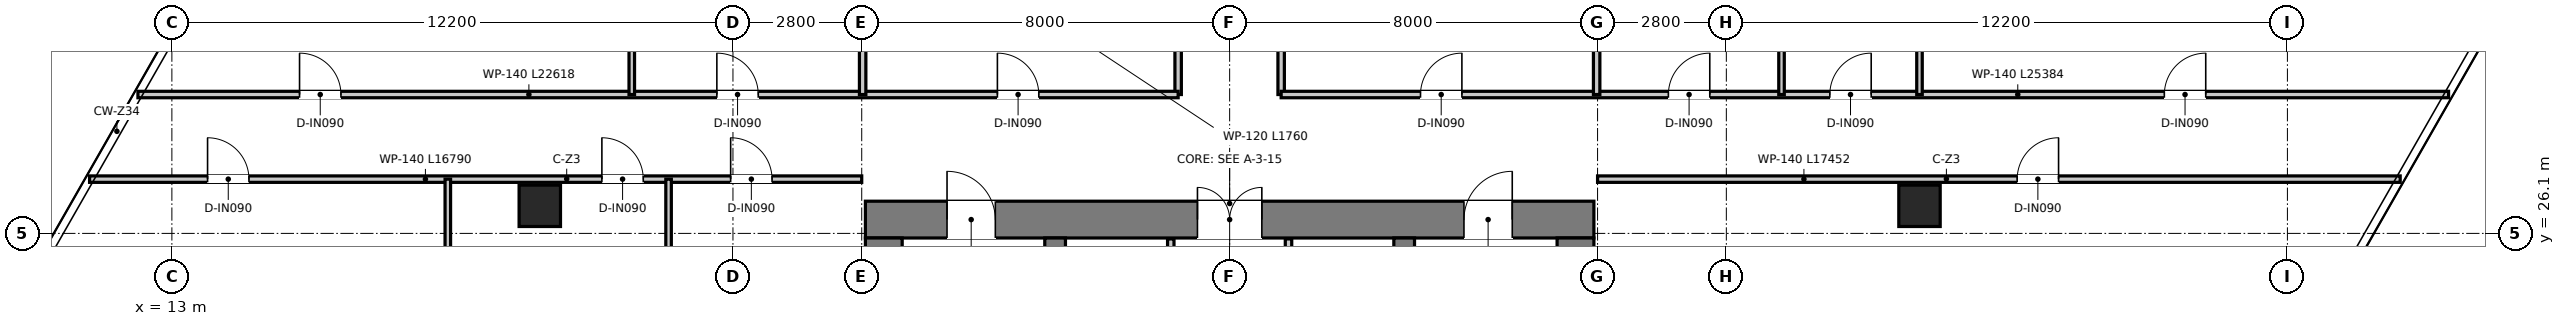
"""IFC4 building model, lengths in metres.
Left out: names, types, materials, properties, quantities, classifications, styles, units other than length and angle.
Written with IfcOpenShell. Run it as: python <this file> out.ifc"""

import sys

from ifc_helpers import new_model, si_unit, direction, frame, frame_2d, origin, origin_2d, place, context, subcontext, project, spatial, rectangle, extrude, source, transform, mapped, element, fill, save


model = new_model("IFC4")
c1 = context("Model", 3, precision=1e-05, world=origin(), true_north=direction((0.0, 1.0)))
c2 = subcontext(c1, "Body", "Model", "MODEL_VIEW")
j1 = project(units=[si_unit("LENGTHUNIT", "METRE"), si_unit("PLANEANGLEUNIT", "RADIAN")], contexts=[c1])
p1 = place(None, origin())
s1 = spatial("IfcSite", under=j1, at=p1, CompositionType="ELEMENT")
p2 = place(p1, origin())
s2 = spatial("IfcBuilding", under=s1, at=p2, CompositionType="ELEMENT")
p3 = place(p2, frame((0.0, 0.0, 162.0)))
s3 = spatial("IfcBuildingStorey", under=s2, at=p3, CompositionType="ELEMENT", Elevation=162.0)
p4 = place(p3, frame((28.08, 26.4, 0.0), z_axis=(0.0, 0.0, 1.0), x_axis=(1.0, 0.0, 0.0)))
e1 = element("IfcWall", 1, at=p4, inside=s3, PredefinedType="SHEAR", context=c2, shape_type="SweptSolid", body=[
    extrude(rectangle(XDim=15.84, YDim=0.8, at=frame_2d((7.92, 0.0))), origin(), (0.0, 0.0, 1.0), 3.95),
])
p5 = place(p4, frame((7.22, 0.0, 0.0)))
e2 = element("IfcOpeningElement", 2, at=p5, cuts=e1, PredefinedType="OPENING", context=c2, shape_type="SweptSolid", body=[
    extrude(rectangle(XDim=1.4, YDim=2.2, at=frame_2d((0.7, 1.1))), frame((0.0, 0.41, 0.0), z_axis=(0.0, -1.0, 0.0), x_axis=(1.0, 0.0, 0.0)), (0.0, 0.0, 1.0), 0.82),
])
p6 = place(p4, frame((1.775, 0.0, 0.0)))
e3 = element("IfcOpeningElement", 3, at=p6, cuts=e1, PredefinedType="OPENING", context=c2, shape_type="SweptSolid", body=[
    extrude(rectangle(XDim=1.05, YDim=2.1, at=frame_2d((0.525, 1.05))), frame((0.0, 0.41, 0.0), z_axis=(0.0, -1.0, 0.0), x_axis=(1.0, 0.0, 0.0)), (0.0, 0.0, 1.0), 0.82),
])
p7 = place(p4, frame((13.015, 0.0, 0.0)))
e4 = element("IfcOpeningElement", 4, at=p7, cuts=e1, PredefinedType="OPENING", context=c2, shape_type="SweptSolid", body=[
    extrude(rectangle(XDim=1.05, YDim=2.1, at=frame_2d((0.525, 1.05))), frame((0.0, 0.41, 0.0), z_axis=(0.0, -1.0, 0.0), x_axis=(1.0, 0.0, 0.0)), (0.0, 0.0, 1.0), 0.82),
])
for number, where, z_axis, x_axis in (
    (5, (28.48, 11.3, 0.0), (0.0, 0.0, 1.0), (0.0, 1.0, 0.0)),
    (6, (43.52, 11.3, 0.0), (0.0, 0.0, 1.0), (0.0, 1.0, 0.0)),
):
    element("IfcWall", number, at=place(p3, frame(where, z_axis=z_axis, x_axis=x_axis)), inside=s3, PredefinedType="SHEAR", context=c2, shape_type="SweptSolid", body=[
        extrude(rectangle(XDim=14.7, YDim=0.8, at=frame_2d((7.35, 0.0))), origin(), (0.0, 0.0, 1.0), 3.95),
    ])
p8 = place(p3, frame((32.205, 13.22, 0.0), z_axis=(0.0, 0.0, 1.0), x_axis=(0.0, 1.0, 0.0)))
e7 = element("IfcWall", 7, at=p8, inside=s3, PredefinedType="SHEAR", context=c2, shape_type="SweptSolid", body=[
    extrude(rectangle(XDim=12.78, YDim=0.45, at=frame_2d((6.39, 0.0))), origin(), (0.0, 0.0, 1.0), 3.95),
])
p9 = place(p8, frame((10.58, 0.0, 0.0)))
e8 = element("IfcOpeningElement", 8, at=p9, cuts=e7, PredefinedType="OPENING", context=c2, shape_type="SweptSolid", body=[
    extrude(rectangle(XDim=1.1, YDim=2.15, at=frame_2d((0.55, 1.075))), frame((0.0, 0.235, 0.0), z_axis=(0.0, -1.0, 0.0), x_axis=(1.0, 0.0, 0.0)), (0.0, 0.0, 1.0), 0.47),
])
p10 = place(p3, frame((39.795, 13.22, 0.0), z_axis=(0.0, 0.0, 1.0), x_axis=(0.0, 1.0, 0.0)))
e9 = element("IfcWall", 9, at=p10, inside=s3, PredefinedType="SHEAR", context=c2, shape_type="SweptSolid", body=[
    extrude(rectangle(XDim=12.78, YDim=0.45, at=frame_2d((6.39, 0.0))), origin(), (0.0, 0.0, 1.0), 3.95),
])
p11 = place(p10, frame((10.58, 0.0, 0.0)))
e10 = element("IfcOpeningElement", 10, at=p11, cuts=e9, PredefinedType="OPENING", context=c2, shape_type="SweptSolid", body=[
    extrude(rectangle(XDim=1.1, YDim=2.15, at=frame_2d((0.55, 1.075))), frame((0.0, 0.235, 0.0), z_axis=(0.0, -1.0, 0.0), x_axis=(1.0, 0.0, 0.0)), (0.0, 0.0, 1.0), 0.47),
])
m1 = source(origin(), c2, "Body", "SweptSolid", [
    extrude(rectangle(XDim=0.9, YDim=0.9, at=origin_2d()), origin(), (0.0, 0.0, 1.0), 3.95),
])
for number, where, z_axis, x_axis in (
    (11, (21.0, 26.7, 0.0), (0.0, 0.0, 1.0), (1.0, 0.0, 0.0)),
    (12, (51.0, 26.7, 0.0), (0.0, 0.0, 1.0), (1.0, 0.0, 0.0)),
):
    element("IfcColumn", number, at=place(p3, frame(where, z_axis=z_axis, x_axis=x_axis)), inside=s3, PredefinedType="COLUMN", context=c2, shape_type="MappedRepresentation", body=[
        mapped(m1, transform((0.0, 0.0, 0.0), x_axis=(1.0, 0.0, 0.0), y_axis=(0.0, 1.0, 0.0), z_axis=(0.0, 0.0, 1.0), scale=1.0)),
    ])
p12 = place(p3, frame((34.72, 20.2, 0.0), z_axis=(0.0, 0.0, 1.0), x_axis=(0.0, 1.0, 0.0)))
e13 = element("IfcWall", 13, at=p12, inside=s3, PredefinedType="PARTITIONING", context=c2, shape_type="SweptSolid", body=[
    extrude(rectangle(XDim=5.78, YDim=0.14, at=frame_2d((2.89, 0.0))), origin(), (0.0, 0.0, 1.0), 2.67),
])
p13 = place(p12, frame((1.05, 0.0, 0.0)))
e14 = element("IfcOpeningElement", 14, at=p13, cuts=e13, PredefinedType="OPENING", context=c2, shape_type="SweptSolid", body=[
    extrude(rectangle(XDim=0.9, YDim=2.1, at=frame_2d((0.45, 1.05))), frame((0.0, 0.08, 0.0), z_axis=(0.0, -1.0, 0.0), x_axis=(1.0, 0.0, 0.0)), (0.0, 0.0, 1.0), 0.16),
])
p14 = place(p3, frame((37.28, 20.2, 0.0), z_axis=(0.0, 0.0, 1.0), x_axis=(0.0, 1.0, 0.0)))
e15 = element("IfcWall", 15, at=p14, inside=s3, PredefinedType="PARTITIONING", context=c2, shape_type="SweptSolid", body=[
    extrude(rectangle(XDim=5.78, YDim=0.14, at=frame_2d((2.89, 0.0))), origin(), (0.0, 0.0, 1.0), 2.67),
])
p15 = place(p14, frame((0.95, 0.0, 0.0)))
e16 = element("IfcOpeningElement", 16, at=p15, cuts=e15, PredefinedType="OPENING", context=c2, shape_type="SweptSolid", body=[
    extrude(rectangle(XDim=1.1, YDim=2.15, at=frame_2d((0.55, 1.075))), frame((0.0, 0.08, 0.0), z_axis=(0.0, -1.0, 0.0), x_axis=(1.0, 0.0, 0.0)), (0.0, 0.0, 1.0), 0.16),
])
p16 = place(p3, frame((34.88, 29.12, 0.0), z_axis=(0.0, 0.0, 1.0), x_axis=(0.0, 1.0, 0.0)))
e17 = element("IfcWall", 17, at=p16, inside=s3, PredefinedType="PARTITIONING", context=c2, shape_type="SweptSolid", body=[
    extrude(rectangle(XDim=11.76, YDim=0.14, at=frame_2d((5.88, 0.0))), origin(), (0.0, 0.0, 1.0), 3.03),
])
p17 = place(p16, frame((4.085, 0.0, 0.0)))
e18 = element("IfcOpeningElement", 18, at=p17, cuts=e17, PredefinedType="OPENING", context=c2, shape_type="SweptSolid", body=[
    extrude(rectangle(XDim=0.95, YDim=2.1, at=frame_2d((0.475, 1.05))), frame((0.0, 0.08, 0.0), z_axis=(0.0, -1.0, 0.0), x_axis=(1.0, 0.0, 0.0)), (0.0, 0.0, 1.0), 0.16),
])
p18 = place(p16, frame((6.82, 0.0, 0.0)))
e19 = element("IfcOpeningElement", 19, at=p18, cuts=e17, PredefinedType="OPENING", context=c2, shape_type="SweptSolid", body=[
    extrude(rectangle(XDim=0.9, YDim=2.1, at=frame_2d((0.45, 1.05))), frame((0.0, 0.08, 0.0), z_axis=(0.0, -1.0, 0.0), x_axis=(1.0, 0.0, 0.0)), (0.0, 0.0, 1.0), 0.16),
])
p19 = place(p16, frame((9.83, 0.0, 0.0)))
e20 = element("IfcOpeningElement", 20, at=p19, cuts=e17, PredefinedType="OPENING", context=c2, shape_type="SweptSolid", body=[
    extrude(rectangle(XDim=0.9, YDim=2.1, at=frame_2d((0.45, 1.05))), frame((0.0, 0.08, 0.0), z_axis=(0.0, -1.0, 0.0), x_axis=(1.0, 0.0, 0.0)), (0.0, 0.0, 1.0), 0.16),
])
p20 = place(p3, frame((37.12, 29.12, 0.0), z_axis=(0.0, 0.0, 1.0), x_axis=(0.0, 1.0, 0.0)))
e21 = element("IfcWall", 21, at=p20, inside=s3, PredefinedType="PARTITIONING", context=c2, shape_type="SweptSolid", body=[
    extrude(rectangle(XDim=11.76, YDim=0.14, at=frame_2d((5.88, 0.0))), origin(), (0.0, 0.0, 1.0), 3.03),
])
p21 = place(p20, frame((3.205, 0.0, 0.0)))
e22 = element("IfcOpeningElement", 22, at=p21, cuts=e21, PredefinedType="OPENING", context=c2, shape_type="SweptSolid", body=[
    extrude(rectangle(XDim=0.95, YDim=2.1, at=frame_2d((0.475, 1.05))), frame((0.0, 0.08, 0.0), z_axis=(0.0, -1.0, 0.0), x_axis=(1.0, 0.0, 0.0)), (0.0, 0.0, 1.0), 0.16),
])
p22 = place(p20, frame((8.02, 0.0, 0.0)))
e23 = element("IfcOpeningElement", 23, at=p22, cuts=e21, PredefinedType="OPENING", context=c2, shape_type="SweptSolid", body=[
    extrude(rectangle(XDim=0.9, YDim=2.1, at=frame_2d((0.45, 1.05))), frame((0.0, 0.08, 0.0), z_axis=(0.0, -1.0, 0.0), x_axis=(1.0, 0.0, 0.0)), (0.0, 0.0, 1.0), 0.16),
])
p23 = place(p3, frame((12.262, 29.12, 0.0), z_axis=(0.0, 0.0, 1.0), x_axis=(1.0, 0.0, 0.0)))
e24 = element("IfcWall", 24, at=p23, inside=s3, PredefinedType="PARTITIONING", context=c2, shape_type="SweptSolid", body=[
    extrude(rectangle(XDim=22.618, YDim=0.14, at=frame_2d((11.309, 0.0))), origin(), (0.0, 0.0, 1.0), 3.03),
])
p24 = place(p23, frame((18.688, 0.0, 0.0)))
e25 = element("IfcOpeningElement", 25, at=p24, cuts=e24, PredefinedType="OPENING", context=c2, shape_type="SweptSolid", body=[
    extrude(rectangle(XDim=0.9, YDim=2.1, at=frame_2d((0.45, 1.05))), frame((0.0, 0.08, 0.0), z_axis=(0.0, -1.0, 0.0), x_axis=(1.0, 0.0, 0.0)), (0.0, 0.0, 1.0), 0.16),
])
p25 = place(p23, frame((3.514, 0.0, 0.0)))
e26 = element("IfcOpeningElement", 26, at=p25, cuts=e24, PredefinedType="OPENING", context=c2, shape_type="SweptSolid", body=[
    extrude(rectangle(XDim=0.9, YDim=2.1, at=frame_2d((0.45, 1.05))), frame((0.0, 0.08, 0.0), z_axis=(0.0, -1.0, 0.0), x_axis=(1.0, 0.0, 0.0)), (0.0, 0.0, 1.0), 0.16),
])
p26 = place(p23, frame((12.588, 0.0, 0.0)))
e27 = element("IfcOpeningElement", 27, at=p26, cuts=e24, PredefinedType="OPENING", context=c2, shape_type="SweptSolid", body=[
    extrude(rectangle(XDim=0.9, YDim=2.1, at=frame_2d((0.45, 1.05))), frame((0.0, 0.08, 0.0), z_axis=(0.0, -1.0, 0.0), x_axis=(1.0, 0.0, 0.0)), (0.0, 0.0, 1.0), 0.16),
])
p27 = place(p3, frame((37.12, 29.12, 0.0), z_axis=(0.0, 0.0, 1.0), x_axis=(1.0, 0.0, 0.0)))
e28 = element("IfcWall", 28, at=p27, inside=s3, PredefinedType="PARTITIONING", context=c2, shape_type="SweptSolid", body=[
    extrude(rectangle(XDim=25.384, YDim=0.14, at=frame_2d((12.692, 0.0))), origin(), (0.0, 0.0, 1.0), 3.03),
])
p28 = place(p27, frame((3.03, 0.0, 0.0)))
e29 = element("IfcOpeningElement", 29, at=p28, cuts=e28, PredefinedType="OPENING", context=c2, shape_type="SweptSolid", body=[
    extrude(rectangle(XDim=0.9, YDim=2.1, at=frame_2d((0.45, 1.05))), frame((0.0, 0.08, 0.0), z_axis=(0.0, -1.0, 0.0), x_axis=(1.0, 0.0, 0.0)), (0.0, 0.0, 1.0), 0.16),
])
p29 = place(p27, frame((8.42, 0.0, 0.0)))
e30 = element("IfcOpeningElement", 30, at=p29, cuts=e28, PredefinedType="OPENING", context=c2, shape_type="SweptSolid", body=[
    extrude(rectangle(XDim=0.9, YDim=2.1, at=frame_2d((0.45, 1.05))), frame((0.0, 0.08, 0.0), z_axis=(0.0, -1.0, 0.0), x_axis=(1.0, 0.0, 0.0)), (0.0, 0.0, 1.0), 0.16),
])
p30 = place(p27, frame((11.93, 0.0, 0.0)))
e31 = element("IfcOpeningElement", 31, at=p30, cuts=e28, PredefinedType="OPENING", context=c2, shape_type="SweptSolid", body=[
    extrude(rectangle(XDim=0.9, YDim=2.1, at=frame_2d((0.45, 1.05))), frame((0.0, 0.08, 0.0), z_axis=(0.0, -1.0, 0.0), x_axis=(1.0, 0.0, 0.0)), (0.0, 0.0, 1.0), 0.16),
])
p31 = place(p27, frame((19.204, 0.0, 0.0)))
e32 = element("IfcOpeningElement", 32, at=p31, cuts=e28, PredefinedType="OPENING", context=c2, shape_type="SweptSolid", body=[
    extrude(rectangle(XDim=0.9, YDim=2.1, at=frame_2d((0.45, 1.05))), frame((0.0, 0.08, 0.0), z_axis=(0.0, -1.0, 0.0), x_axis=(1.0, 0.0, 0.0)), (0.0, 0.0, 1.0), 0.16),
])
p32 = place(p3, frame((11.21, 27.28, 0.0), z_axis=(0.0, 0.0, 1.0), x_axis=(1.0, 0.0, 0.0)))
e33 = element("IfcWall", 33, at=p32, inside=s3, PredefinedType="PARTITIONING", context=c2, shape_type="SweptSolid", body=[
    extrude(rectangle(XDim=16.79, YDim=0.14, at=frame_2d((8.395, 0.0))), origin(), (0.0, 0.0, 1.0), 3.03),
])
p33 = place(p32, frame((2.565, 0.0, 0.0)))
e34 = element("IfcOpeningElement", 34, at=p33, cuts=e33, PredefinedType="OPENING", context=c2, shape_type="SweptSolid", body=[
    extrude(rectangle(XDim=0.9, YDim=2.1, at=frame_2d((0.45, 1.05))), frame((0.0, 0.08, 0.0), z_axis=(0.0, -1.0, 0.0), x_axis=(1.0, 0.0, 0.0)), (0.0, 0.0, 1.0), 0.16),
])
p34 = place(p32, frame((11.139, 0.0, 0.0)))
e35 = element("IfcOpeningElement", 35, at=p34, cuts=e33, PredefinedType="OPENING", context=c2, shape_type="SweptSolid", body=[
    extrude(rectangle(XDim=0.9, YDim=2.1, at=frame_2d((0.45, 1.05))), frame((0.0, 0.08, 0.0), z_axis=(0.0, -1.0, 0.0), x_axis=(1.0, 0.0, 0.0)), (0.0, 0.0, 1.0), 0.16),
])
p35 = place(p32, frame((13.939, 0.0, 0.0)))
e36 = element("IfcOpeningElement", 36, at=p35, cuts=e33, PredefinedType="OPENING", context=c2, shape_type="SweptSolid", body=[
    extrude(rectangle(XDim=0.9, YDim=2.1, at=frame_2d((0.45, 1.05))), frame((0.0, 0.08, 0.0), z_axis=(0.0, -1.0, 0.0), x_axis=(1.0, 0.0, 0.0)), (0.0, 0.0, 1.0), 0.16),
])
p36 = place(p3, frame((44.0, 27.28, 0.0), z_axis=(0.0, 0.0, 1.0), x_axis=(1.0, 0.0, 0.0)))
e37 = element("IfcWall", 37, at=p36, inside=s3, PredefinedType="PARTITIONING", context=c2, shape_type="SweptSolid", body=[
    extrude(rectangle(XDim=17.452, YDim=0.14, at=frame_2d((8.726, 0.0))), origin(), (0.0, 0.0, 1.0), 3.03),
])
p37 = place(p36, frame((9.124, 0.0, 0.0)))
e38 = element("IfcOpeningElement", 38, at=p37, cuts=e37, PredefinedType="OPENING", context=c2, shape_type="SweptSolid", body=[
    extrude(rectangle(XDim=0.9, YDim=2.1, at=frame_2d((0.45, 1.05))), frame((0.0, 0.08, 0.0), z_axis=(0.0, -1.0, 0.0), x_axis=(1.0, 0.0, 0.0)), (0.0, 0.0, 1.0), 0.16),
])
for number, where, z_axis, x_axis in (
    (39, (28.02, 29.12, 0.0), (0.0, 0.0, 1.0), (0.0, 1.0, 0.0)),
    (40, (43.98, 29.12, 0.0), (0.0, 0.0, 1.0), (0.0, 1.0, 0.0)),
):
    element("IfcWall", number, at=place(p3, frame(where, z_axis=z_axis, x_axis=x_axis)), inside=s3, PredefinedType="PARTITIONING", context=c2, shape_type="SweptSolid", body=[
        extrude(rectangle(XDim=5.46, YDim=0.14, at=frame_2d((2.73, 0.0))), origin(), (0.0, 0.0, 1.0), 3.31),
    ])
p38 = place(p3, frame((23.0, 29.12, 0.0), z_axis=(0.0, 0.0, 1.0), x_axis=(0.0, 1.0, 0.0)))
e41 = element("IfcWall", 41, at=p38, inside=s3, PredefinedType="PARTITIONING", context=c2, shape_type="SweptSolid", body=[
    extrude(rectangle(XDim=18.787, YDim=0.12, at=frame_2d((9.394, 0.0))), origin(), (0.0, 0.0, 1.0), 3.08),
])
p39 = place(p3, frame((48.0, 29.12, 0.0), z_axis=(0.0, 0.0, 1.0), x_axis=(0.0, 1.0, 0.0)))
e42 = element("IfcWall", 42, at=p39, inside=s3, PredefinedType="PARTITIONING", context=c2, shape_type="SweptSolid", body=[
    extrude(rectangle(XDim=15.842, YDim=0.12, at=frame_2d((7.921, 0.0))), origin(), (0.0, 0.0, 1.0), 3.08),
])
p40 = place(p3, frame((51.0, 29.12, 0.0), z_axis=(0.0, 0.0, 1.0), x_axis=(0.0, 1.0, 0.0)))
e43 = element("IfcWall", 43, at=p40, inside=s3, PredefinedType="PARTITIONING", context=c2, shape_type="SweptSolid", body=[
    extrude(rectangle(XDim=14.128, YDim=0.12, at=frame_2d((7.064, 0.0))), origin(), (0.0, 0.0, 1.0), 3.08),
])
p41 = place(p3, frame((19.0, 11.295, 0.0), z_axis=(0.0, 0.0, 1.0), x_axis=(0.0, 1.0, 0.0)))
e44 = element("IfcWall", 44, at=p41, inside=s3, PredefinedType="PARTITIONING", context=c2, shape_type="SweptSolid", body=[
    extrude(rectangle(XDim=15.985, YDim=0.12, at=frame_2d((7.992, 0.0))), origin(), (0.0, 0.0, 1.0), 3.67),
])
p42 = place(p3, frame((23.8, 8.552, 0.0), z_axis=(0.0, 0.0, 1.0), x_axis=(0.0, 1.0, 0.0)))
e45 = element("IfcWall", 45, at=p42, inside=s3, PredefinedType="PARTITIONING", context=c2, shape_type="SweptSolid", body=[
    extrude(rectangle(XDim=18.728, YDim=0.12, at=frame_2d((9.364, 0.0))), origin(), (0.0, 0.0, 1.0), 3.08),
])
p43 = place(p5, origin())
e46 = element("IfcDoor", 46, at=p43, inside=s3, OperationType="DOUBLE_DOOR_SINGLE_SWING", PredefinedType="DOOR", context=c2, shape_type="SweptSolid", body=[
    extrude(rectangle(XDim=1.4, YDim=2.2, at=frame_2d((0.7, 1.1))), frame((0.0, 0.025, 0.0), z_axis=(0.0, -1.0, 0.0), x_axis=(1.0, 0.0, 0.0)), (0.0, 0.0, 1.0), 0.05),
])
fill(e2, e46)
p44 = place(p6, origin())
e47 = element("IfcDoor", 47, at=p44, inside=s3, OperationType="SINGLE_SWING_LEFT", PredefinedType="DOOR", context=c2, shape_type="SweptSolid", body=[
    extrude(rectangle(XDim=1.05, YDim=2.1, at=frame_2d((0.525, 1.05))), frame((0.0, 0.025, 0.0), z_axis=(0.0, -1.0, 0.0), x_axis=(1.0, 0.0, 0.0)), (0.0, 0.0, 1.0), 0.05),
])
fill(e3, e47)
p45 = place(p7, origin())
e48 = element("IfcDoor", 48, at=p45, inside=s3, OperationType="SINGLE_SWING_RIGHT", PredefinedType="DOOR", context=c2, shape_type="SweptSolid", body=[
    extrude(rectangle(XDim=1.05, YDim=2.1, at=frame_2d((0.525, 1.05))), frame((0.0, 0.025, 0.0), z_axis=(0.0, -1.0, 0.0), x_axis=(1.0, 0.0, 0.0)), (0.0, 0.0, 1.0), 0.05),
])
fill(e4, e48)
p46 = place(p24, origin())
e49 = element("IfcDoor", 49, at=p46, inside=s3, OperationType="SINGLE_SWING_LEFT", PredefinedType="DOOR", context=c2, shape_type="SweptSolid", body=[
    extrude(rectangle(XDim=0.9, YDim=2.1, at=frame_2d((0.45, 1.05))), frame((0.0, 0.025, 0.0), z_axis=(0.0, -1.0, 0.0), x_axis=(1.0, 0.0, 0.0)), (0.0, 0.0, 1.0), 0.05),
])
fill(e25, e49)
p47 = place(p28, origin())
e50 = element("IfcDoor", 50, at=p47, inside=s3, OperationType="SINGLE_SWING_RIGHT", PredefinedType="DOOR", context=c2, shape_type="SweptSolid", body=[
    extrude(rectangle(XDim=0.9, YDim=2.1, at=frame_2d((0.45, 1.05))), frame((0.0, 0.025, 0.0), z_axis=(0.0, -1.0, 0.0), x_axis=(1.0, 0.0, 0.0)), (0.0, 0.0, 1.0), 0.05),
])
fill(e29, e50)
p48 = place(p25, origin())
e51 = element("IfcDoor", 51, at=p48, inside=s3, OperationType="SINGLE_SWING_LEFT", PredefinedType="DOOR", context=c2, shape_type="SweptSolid", body=[
    extrude(rectangle(XDim=0.9, YDim=2.1, at=frame_2d((0.45, 1.05))), frame((0.0, 0.025, 0.0), z_axis=(0.0, -1.0, 0.0), x_axis=(1.0, 0.0, 0.0)), (0.0, 0.0, 1.0), 0.05),
])
fill(e26, e51)
p49 = place(p26, origin())
e52 = element("IfcDoor", 52, at=p49, inside=s3, OperationType="SINGLE_SWING_LEFT", PredefinedType="DOOR", context=c2, shape_type="SweptSolid", body=[
    extrude(rectangle(XDim=0.9, YDim=2.1, at=frame_2d((0.45, 1.05))), frame((0.0, 0.025, 0.0), z_axis=(0.0, -1.0, 0.0), x_axis=(1.0, 0.0, 0.0)), (0.0, 0.0, 1.0), 0.05),
])
fill(e27, e52)
p50 = place(p29, origin())
e53 = element("IfcDoor", 53, at=p50, inside=s3, OperationType="SINGLE_SWING_RIGHT", PredefinedType="DOOR", context=c2, shape_type="SweptSolid", body=[
    extrude(rectangle(XDim=0.9, YDim=2.1, at=frame_2d((0.45, 1.05))), frame((0.0, 0.025, 0.0), z_axis=(0.0, -1.0, 0.0), x_axis=(1.0, 0.0, 0.0)), (0.0, 0.0, 1.0), 0.05),
])
fill(e30, e53)
p51 = place(p30, origin())
e54 = element("IfcDoor", 54, at=p51, inside=s3, OperationType="SINGLE_SWING_RIGHT", PredefinedType="DOOR", context=c2, shape_type="SweptSolid", body=[
    extrude(rectangle(XDim=0.9, YDim=2.1, at=frame_2d((0.45, 1.05))), frame((0.0, 0.025, 0.0), z_axis=(0.0, -1.0, 0.0), x_axis=(1.0, 0.0, 0.0)), (0.0, 0.0, 1.0), 0.05),
])
fill(e31, e54)
p52 = place(p31, origin())
e55 = element("IfcDoor", 55, at=p52, inside=s3, OperationType="SINGLE_SWING_RIGHT", PredefinedType="DOOR", context=c2, shape_type="SweptSolid", body=[
    extrude(rectangle(XDim=0.9, YDim=2.1, at=frame_2d((0.45, 1.05))), frame((0.0, 0.025, 0.0), z_axis=(0.0, -1.0, 0.0), x_axis=(1.0, 0.0, 0.0)), (0.0, 0.0, 1.0), 0.05),
])
fill(e32, e55)
p53 = place(p33, origin())
e56 = element("IfcDoor", 56, at=p53, inside=s3, OperationType="SINGLE_SWING_LEFT", PredefinedType="DOOR", context=c2, shape_type="SweptSolid", body=[
    extrude(rectangle(XDim=0.9, YDim=2.1, at=frame_2d((0.45, 1.05))), frame((0.0, 0.025, 0.0), z_axis=(0.0, -1.0, 0.0), x_axis=(1.0, 0.0, 0.0)), (0.0, 0.0, 1.0), 0.05),
])
fill(e34, e56)
p54 = place(p34, origin())
e57 = element("IfcDoor", 57, at=p54, inside=s3, OperationType="SINGLE_SWING_LEFT", PredefinedType="DOOR", context=c2, shape_type="SweptSolid", body=[
    extrude(rectangle(XDim=0.9, YDim=2.1, at=frame_2d((0.45, 1.05))), frame((0.0, 0.025, 0.0), z_axis=(0.0, -1.0, 0.0), x_axis=(1.0, 0.0, 0.0)), (0.0, 0.0, 1.0), 0.05),
])
fill(e35, e57)
p55 = place(p35, origin())
e58 = element("IfcDoor", 58, at=p55, inside=s3, OperationType="SINGLE_SWING_LEFT", PredefinedType="DOOR", context=c2, shape_type="SweptSolid", body=[
    extrude(rectangle(XDim=0.9, YDim=2.1, at=frame_2d((0.45, 1.05))), frame((0.0, 0.025, 0.0), z_axis=(0.0, -1.0, 0.0), x_axis=(1.0, 0.0, 0.0)), (0.0, 0.0, 1.0), 0.05),
])
fill(e36, e58)
p56 = place(p37, origin())
e59 = element("IfcDoor", 59, at=p56, inside=s3, OperationType="SINGLE_SWING_RIGHT", PredefinedType="DOOR", context=c2, shape_type="SweptSolid", body=[
    extrude(rectangle(XDim=0.9, YDim=2.1, at=frame_2d((0.45, 1.05))), frame((0.0, 0.025, 0.0), z_axis=(0.0, -1.0, 0.0), x_axis=(1.0, 0.0, 0.0)), (0.0, 0.0, 1.0), 0.05),
])
fill(e38, e59)
save(model, sys.argv[1])
